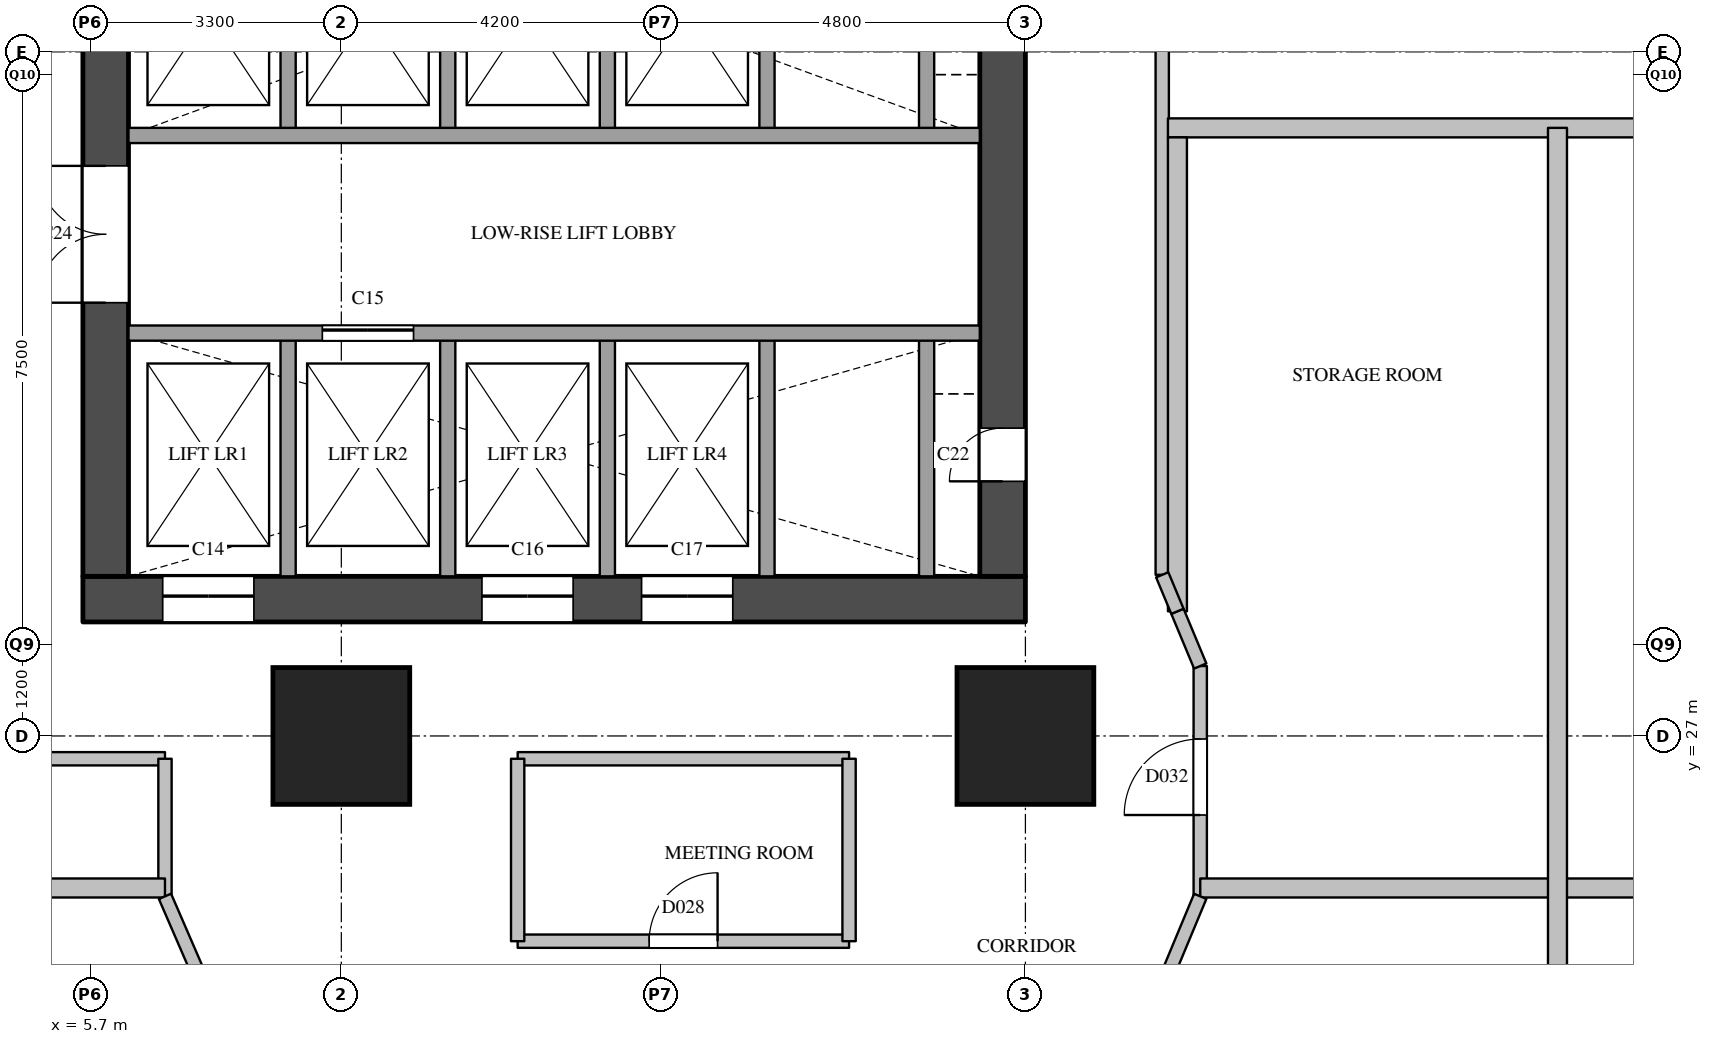
"""IFC4 building model, lengths in metres.
Left out: names, types, materials, properties, quantities, classifications, styles, units other than length and angle.
Written with IfcOpenShell. Run it as: python <this file> out.ifc"""

import sys

from ifc_helpers import new_model, si_unit, direction, frame, frame_2d, origin, origin_2d, place, context, subcontext, project, spatial, rectangle, extrude, element, fill, save


model = new_model("IFC4")
c1 = context("Model", 3, precision=1e-05, world=origin(), true_north=direction((0.0, 1.0)))
c2 = subcontext(c1, "Body", "Model", "MODEL_VIEW")
j1 = project(units=[si_unit("LENGTHUNIT", "METRE"), si_unit("PLANEANGLEUNIT", "RADIAN")], contexts=[c1])
p1 = place(None, origin())
s1 = spatial("IfcSite", under=j1, at=p1, CompositionType="ELEMENT")
p2 = place(p1, origin())
s2 = spatial("IfcBuilding", under=s1, at=p2, CompositionType="ELEMENT")
p3 = place(p2, frame((0.0, 0.0, 72.8)))
s3 = spatial("IfcBuildingStorey", under=s2, at=p3, CompositionType="ELEMENT", Elevation=72.8)
for number, where, z_axis, x_axis in (
    (1, (9.0, 27.0, 0.0), (0.0, 0.0, 1.0), (1.0, 0.0, 0.0)),
    (2, (18.0, 27.0, 0.0), (0.0, 0.0, 1.0), (1.0, 0.0, 0.0)),
):
    element("IfcColumn", number, at=place(p3, frame(where, z_axis=z_axis, x_axis=x_axis)), inside=s3, PredefinedType="COLUMN", context=c2, shape_type="SweptSolid", body=[
        extrude(rectangle(XDim=1.8, YDim=1.8, at=origin_2d()), origin(), (0.0, 0.0, 1.0), 5.0),
    ])
p4 = place(p3, frame((5.6, 28.8, 0.0), z_axis=(0.0, 0.0, 1.0), x_axis=(1.0, 0.0, 0.0)))
e3 = element("IfcWall", 3, at=p4, inside=s3, PredefinedType="SHEAR", context=c2, shape_type="SweptSolid", body=[
    extrude(rectangle(XDim=12.4, YDim=0.6, at=frame_2d((6.2, 0.0))), origin(), (0.0, 0.0, 1.0), 4.7),
])
p5 = place(p4, frame((1.05, 0.0, 0.0)))
e4 = element("IfcOpeningElement", 4, at=p5, cuts=e3, PredefinedType="OPENING", context=c2, shape_type="SweptSolid", body=[
    extrude(rectangle(XDim=1.2, YDim=2.1, at=frame_2d((0.6, 1.05))), frame((0.0, 0.31, 0.0), z_axis=(0.0, -1.0, 0.0), x_axis=(1.0, 0.0, 0.0)), (0.0, 0.0, 1.0), 0.62),
])
p6 = place(p4, frame((5.25, 0.0, 0.0)))
e5 = element("IfcOpeningElement", 5, at=p6, cuts=e3, PredefinedType="OPENING", context=c2, shape_type="SweptSolid", body=[
    extrude(rectangle(XDim=1.2, YDim=2.1, at=frame_2d((0.6, 1.05))), frame((0.0, 0.31, 0.0), z_axis=(0.0, -1.0, 0.0), x_axis=(1.0, 0.0, 0.0)), (0.0, 0.0, 1.0), 0.62),
])
p7 = place(p4, frame((7.35, 0.0, 0.0)))
e6 = element("IfcOpeningElement", 6, at=p7, cuts=e3, PredefinedType="OPENING", context=c2, shape_type="SweptSolid", body=[
    extrude(rectangle(XDim=1.2, YDim=2.1, at=frame_2d((0.6, 1.05))), frame((0.0, 0.31, 0.0), z_axis=(0.0, -1.0, 0.0), x_axis=(1.0, 0.0, 0.0)), (0.0, 0.0, 1.0), 0.62),
])
p8 = place(p3, frame((5.9, 29.1, 0.0), z_axis=(0.0, 0.0, 1.0), x_axis=(0.0, 1.0, 0.0)))
e7 = element("IfcWall", 7, at=p8, inside=s3, PredefinedType="SHEAR", context=c2, shape_type="SweptSolid", body=[
    extrude(rectangle(XDim=20.3, YDim=0.6, at=frame_2d((10.15, 0.0))), origin(), (0.0, 0.0, 1.0), 4.7),
])
p9 = place(p8, frame((3.6, 0.0, 0.0)))
e8 = element("IfcOpeningElement", 8, at=p9, cuts=e7, PredefinedType="OPENING", context=c2, shape_type="SweptSolid", body=[
    extrude(rectangle(XDim=1.8, YDim=2.1, at=frame_2d((0.9, 1.05))), frame((0.0, 0.31, 0.0), z_axis=(0.0, -1.0, 0.0), x_axis=(1.0, 0.0, 0.0)), (0.0, 0.0, 1.0), 0.62),
])
p10 = place(p8, frame((16.4, 0.0, 0.0)))
e9 = element("IfcOpeningElement", 9, at=p10, cuts=e7, PredefinedType="OPENING", context=c2, shape_type="SweptSolid", body=[
    extrude(rectangle(XDim=1.0, YDim=2.1, at=frame_2d((0.5, 1.05))), frame((0.0, 0.31, 0.0), z_axis=(0.0, -1.0, 0.0), x_axis=(1.0, 0.0, 0.0)), (0.0, 0.0, 1.0), 0.62),
])
p11 = place(p3, frame((17.7, 29.1, 0.0), z_axis=(0.0, 0.0, 1.0), x_axis=(0.0, 1.0, 0.0)))
e10 = element("IfcWall", 10, at=p11, inside=s3, PredefinedType="SHEAR", context=c2, shape_type="SweptSolid", body=[
    extrude(rectangle(XDim=20.3, YDim=0.6, at=frame_2d((10.15, 0.0))), origin(), (0.0, 0.0, 1.0), 4.7),
])
p12 = place(p11, frame((1.25, 0.0, 0.0)))
e11 = element("IfcOpeningElement", 11, at=p12, cuts=e10, PredefinedType="OPENING", context=c2, shape_type="SweptSolid", body=[
    extrude(rectangle(XDim=0.7, YDim=2.1, at=frame_2d((0.35, 1.05))), frame((0.0, 0.31, 0.0), z_axis=(0.0, -1.0, 0.0), x_axis=(1.0, 0.0, 0.0)), (0.0, 0.0, 1.0), 0.62),
])
p13 = place(p11, frame((7.05, 0.0, 0.0)))
e12 = element("IfcOpeningElement", 12, at=p13, cuts=e10, PredefinedType="OPENING", context=c2, shape_type="SweptSolid", body=[
    extrude(rectangle(XDim=0.7, YDim=2.1, at=frame_2d((0.35, 1.05))), frame((0.0, 0.31, 0.0), z_axis=(0.0, -1.0, 0.0), x_axis=(1.0, 0.0, 0.0)), (0.0, 0.0, 1.0), 0.62),
])
p14 = place(p3, frame((8.3, 29.1, 0.0), z_axis=(0.0, 0.0, 1.0), x_axis=(0.0, 1.0, 0.0)))
e13 = element("IfcWall", 13, at=p14, inside=s3, PredefinedType="SOLIDWALL", context=c2, shape_type="SweptSolid", body=[
    extrude(rectangle(XDim=3.2, YDim=0.2, at=frame_2d((1.6, 0.0))), origin(), (0.0, 0.0, 1.0), 4.7),
])
p15 = place(p3, frame((8.3, 34.9, 0.0), z_axis=(0.0, 0.0, 1.0), x_axis=(0.0, 1.0, 0.0)))
e14 = element("IfcWall", 14, at=p15, inside=s3, PredefinedType="SOLIDWALL", context=c2, shape_type="SweptSolid", body=[
    extrude(rectangle(XDim=3.2, YDim=0.2, at=frame_2d((1.6, 0.0))), origin(), (0.0, 0.0, 1.0), 4.7),
])
p16 = place(p3, frame((10.4, 29.1, 0.0), z_axis=(0.0, 0.0, 1.0), x_axis=(0.0, 1.0, 0.0)))
e15 = element("IfcWall", 15, at=p16, inside=s3, PredefinedType="SOLIDWALL", context=c2, shape_type="SweptSolid", body=[
    extrude(rectangle(XDim=3.2, YDim=0.2, at=frame_2d((1.6, 0.0))), origin(), (0.0, 0.0, 1.0), 4.7),
])
p17 = place(p3, frame((10.4, 34.9, 0.0), z_axis=(0.0, 0.0, 1.0), x_axis=(0.0, 1.0, 0.0)))
e16 = element("IfcWall", 16, at=p17, inside=s3, PredefinedType="SOLIDWALL", context=c2, shape_type="SweptSolid", body=[
    extrude(rectangle(XDim=3.2, YDim=0.2, at=frame_2d((1.6, 0.0))), origin(), (0.0, 0.0, 1.0), 4.7),
])
p18 = place(p3, frame((12.5, 29.1, 0.0), z_axis=(0.0, 0.0, 1.0), x_axis=(0.0, 1.0, 0.0)))
e17 = element("IfcWall", 17, at=p18, inside=s3, PredefinedType="SOLIDWALL", context=c2, shape_type="SweptSolid", body=[
    extrude(rectangle(XDim=3.2, YDim=0.2, at=frame_2d((1.6, 0.0))), origin(), (0.0, 0.0, 1.0), 4.7),
])
p19 = place(p3, frame((12.5, 34.9, 0.0), z_axis=(0.0, 0.0, 1.0), x_axis=(0.0, 1.0, 0.0)))
e18 = element("IfcWall", 18, at=p19, inside=s3, PredefinedType="SOLIDWALL", context=c2, shape_type="SweptSolid", body=[
    extrude(rectangle(XDim=3.2, YDim=0.2, at=frame_2d((1.6, 0.0))), origin(), (0.0, 0.0, 1.0), 4.7),
])
p20 = place(p3, frame((14.6, 29.1, 0.0), z_axis=(0.0, 0.0, 1.0), x_axis=(0.0, 1.0, 0.0)))
e19 = element("IfcWall", 19, at=p20, inside=s3, PredefinedType="SOLIDWALL", context=c2, shape_type="SweptSolid", body=[
    extrude(rectangle(XDim=3.2, YDim=0.2, at=frame_2d((1.6, 0.0))), origin(), (0.0, 0.0, 1.0), 4.7),
])
p21 = place(p3, frame((14.6, 34.9, 0.0), z_axis=(0.0, 0.0, 1.0), x_axis=(0.0, 1.0, 0.0)))
e20 = element("IfcWall", 20, at=p21, inside=s3, PredefinedType="SOLIDWALL", context=c2, shape_type="SweptSolid", body=[
    extrude(rectangle(XDim=3.2, YDim=0.2, at=frame_2d((1.6, 0.0))), origin(), (0.0, 0.0, 1.0), 4.7),
])
p22 = place(p3, frame((16.7, 29.1, 0.0), z_axis=(0.0, 0.0, 1.0), x_axis=(0.0, 1.0, 0.0)))
e21 = element("IfcWall", 21, at=p22, inside=s3, PredefinedType="SOLIDWALL", context=c2, shape_type="SweptSolid", body=[
    extrude(rectangle(XDim=3.2, YDim=0.2, at=frame_2d((1.6, 0.0))), origin(), (0.0, 0.0, 1.0), 4.7),
])
p23 = place(p3, frame((16.7, 34.9, 0.0), z_axis=(0.0, 0.0, 1.0), x_axis=(0.0, 1.0, 0.0)))
e22 = element("IfcWall", 22, at=p23, inside=s3, PredefinedType="SOLIDWALL", context=c2, shape_type="SweptSolid", body=[
    extrude(rectangle(XDim=3.2, YDim=0.2, at=frame_2d((1.6, 0.0))), origin(), (0.0, 0.0, 1.0), 4.7),
])
p24 = place(p3, frame((6.2, 32.3, 0.0), z_axis=(0.0, 0.0, 1.0), x_axis=(1.0, 0.0, 0.0)))
e23 = element("IfcWall", 23, at=p24, inside=s3, PredefinedType="SOLIDWALL", context=c2, shape_type="SweptSolid", body=[
    extrude(rectangle(XDim=11.2, YDim=0.2, at=frame_2d((5.6, 0.0))), origin(), (0.0, 0.0, 1.0), 4.7),
])
p25 = place(p24, frame((2.55, 0.0, 0.0)))
e24 = element("IfcOpeningElement", 24, at=p25, cuts=e23, PredefinedType="OPENING", context=c2, shape_type="SweptSolid", body=[
    extrude(rectangle(XDim=1.2, YDim=2.1, at=frame_2d((0.6, 1.05))), frame((0.0, 0.11, 0.0), z_axis=(0.0, -1.0, 0.0), x_axis=(1.0, 0.0, 0.0)), (0.0, 0.0, 1.0), 0.22),
])
p26 = place(p3, frame((6.2, 34.9, 0.0), z_axis=(0.0, 0.0, 1.0), x_axis=(1.0, 0.0, 0.0)))
e25 = element("IfcWall", 25, at=p26, inside=s3, PredefinedType="SOLIDWALL", context=c2, shape_type="SweptSolid", body=[
    extrude(rectangle(XDim=11.2, YDim=0.2, at=frame_2d((5.6, 0.0))), origin(), (0.0, 0.0, 1.0), 4.7),
])
p27 = place(p3, frame((11.32, 24.3, 0.0), z_axis=(0.0, 0.0, 1.0), x_axis=(1.0, 0.0, 0.0)))
e26 = element("IfcWall", 26, at=p27, inside=s3, PredefinedType="PARTITIONING", context=c2, shape_type="SweptSolid", body=[
    extrude(rectangle(XDim=4.36, YDim=0.175, at=frame_2d((2.18, 0.0))), origin(), (0.0, 0.0, 1.0), 4.7),
])
p28 = place(p27, frame((1.73, 0.0, 0.0)))
e27 = element("IfcOpeningElement", 27, at=p28, cuts=e26, PredefinedType="OPENING", context=c2, shape_type="SweptSolid", body=[
    extrude(rectangle(XDim=0.9, YDim=2.1, at=frame_2d((0.45, 1.05))), frame((0.0, 0.097, 0.0), z_axis=(0.0, -1.0, 0.0), x_axis=(1.0, 0.0, 0.0)), (0.0, 0.0, 1.0), 0.195),
])
p29 = place(p3, frame((3.8, 26.7, 0.0), z_axis=(0.0, 0.0, 1.0), x_axis=(1.0, 0.0, 0.0)))
e28 = element("IfcWall", 28, at=p29, inside=s3, PredefinedType="PARTITIONING", context=c2, shape_type="SweptSolid", body=[
    extrude(rectangle(XDim=2.88, YDim=0.175, at=frame_2d((1.44, 0.0))), origin(), (0.0, 0.0, 1.0), 3.59),
])
p30 = place(p3, frame((11.32, 26.7, 0.0), z_axis=(0.0, 0.0, 1.0), x_axis=(1.0, 0.0, 0.0)))
e29 = element("IfcWall", 29, at=p30, inside=s3, PredefinedType="PARTITIONING", context=c2, shape_type="SweptSolid", body=[
    extrude(rectangle(XDim=4.36, YDim=0.175, at=frame_2d((2.18, 0.0))), origin(), (0.0, 0.0, 1.0), 3.59),
])
p31 = place(p3, frame((6.68, 24.89, 0.0), z_axis=(0.0, 0.0, 1.0), x_axis=(0.0, 1.0, 0.0)))
e30 = element("IfcWall", 30, at=p31, inside=s3, PredefinedType="PARTITIONING", context=c2, shape_type="SweptSolid", body=[
    extrude(rectangle(XDim=1.81, YDim=0.175, at=frame_2d((0.905, 0.0))), origin(), (0.0, 0.0, 1.0), 3.59),
])
for number, where, z_axis, x_axis in (
    (31, (11.32, 24.3, 0.0), (0.0, 0.0, 1.0), (0.0, 1.0, 0.0)),
    (32, (15.68, 24.3, 0.0), (0.0, 0.0, 1.0), (0.0, 1.0, 0.0)),
):
    element("IfcWall", number, at=place(p3, frame(where, z_axis=z_axis, x_axis=x_axis)), inside=s3, PredefinedType="PARTITIONING", context=c2, shape_type="SweptSolid", body=[
        extrude(rectangle(XDim=2.4, YDim=0.175, at=frame_2d((1.2, 0.0))), origin(), (0.0, 0.0, 1.0), 3.59),
    ])
p32 = place(p3, frame((19.8, 29.12, 0.0), z_axis=(0.0, 0.0, 1.0), x_axis=(0.0, 1.0, 0.0)))
e33 = element("IfcWall", 33, at=p32, inside=s3, PredefinedType="PARTITIONING", context=c2, shape_type="SweptSolid", body=[
    extrude(rectangle(XDim=22.68, YDim=0.175, at=frame_2d((11.34, 0.0))), origin(), (0.0, 0.0, 1.0), 4.7),
])
p33 = place(p32, frame((7.49, 0.0, 0.0)))
e34 = element("IfcOpeningElement", 34, at=p33, cuts=e33, PredefinedType="OPENING", context=c2, shape_type="SweptSolid", body=[
    extrude(rectangle(XDim=0.9, YDim=2.1, at=frame_2d((0.45, 1.05))), frame((0.0, 0.097, 0.0), z_axis=(0.0, -1.0, 0.0), x_axis=(1.0, 0.0, 0.0)), (0.0, 0.0, 1.0), 0.195),
])
p34 = place(p3, frame((20.3, 24.89, 0.0), z_axis=(0.0, 0.0, 1.0), x_axis=(0.0, 1.0, 0.0)))
e35 = element("IfcWall", 35, at=p34, inside=s3, PredefinedType="PARTITIONING", context=c2, shape_type="SweptSolid", body=[
    extrude(rectangle(XDim=3.03, YDim=0.175, at=frame_2d((1.515, 0.0))), origin(), (0.0, 0.0, 1.0), 3.59),
])
p35 = place(p34, frame((1.07, 0.0, 0.0)))
e36 = element("IfcOpeningElement", 36, at=p35, cuts=e35, PredefinedType="OPENING", context=c2, shape_type="SweptSolid", body=[
    extrude(rectangle(XDim=1.0, YDim=2.1, at=frame_2d((0.5, 1.05))), frame((0.0, 0.097, 0.0), z_axis=(0.0, -1.0, 0.0), x_axis=(1.0, 0.0, 0.0)), (0.0, 0.0, 1.0), 0.195),
])
p36 = place(p3, frame((0.0, 25.0, 0.0), z_axis=(0.0, 0.0, 1.0), x_axis=(1.0, 0.0, 0.0)))
e37 = element("IfcWall", 37, at=p36, inside=s3, PredefinedType="PARTITIONING", context=c2, shape_type="SweptSolid", body=[
    extrude(rectangle(XDim=6.68, YDim=0.25, at=frame_2d((3.34, 0.0))), origin(), (0.0, 0.0, 1.0), 3.59),
])
p37 = place(p3, frame((20.3, 25.0, 0.0), z_axis=(0.0, 0.0, 1.0), x_axis=(1.0, 0.0, 0.0)))
e38 = element("IfcWall", 38, at=p37, inside=s3, PredefinedType="PARTITIONING", context=c2, shape_type="SweptSolid", body=[
    extrude(rectangle(XDim=13.4, YDim=0.25, at=frame_2d((6.7, 0.0))), origin(), (0.0, 0.0, 1.0), 3.59),
])
p38 = place(p3, frame((19.875, 35.0, 0.0), z_axis=(0.0, 0.0, 1.0), x_axis=(1.0, 0.0, 0.0)))
e39 = element("IfcWall", 39, at=p38, inside=s3, PredefinedType="PARTITIONING", context=c2, shape_type="SweptSolid", body=[
    extrude(rectangle(XDim=14.325, YDim=0.25, at=frame_2d((7.163, 0.0))), origin(), (0.0, 0.0, 1.0), 3.7),
])
p39 = place(p3, frame((20.0, 28.64, 0.0), z_axis=(0.0, 0.0, 1.0), x_axis=(0.0, 1.0, 0.0)))
e40 = element("IfcWall", 40, at=p39, inside=s3, PredefinedType="PARTITIONING", context=c2, shape_type="SweptSolid", body=[
    extrude(rectangle(XDim=6.235, YDim=0.25, at=frame_2d((3.118, 0.0))), origin(), (0.0, 0.0, 1.0), 4.7),
])
p40 = place(p3, frame((25.0, 0.0, 0.0), z_axis=(0.0, 0.0, 1.0), x_axis=(0.0, 1.0, 0.0)))
e41 = element("IfcWall", 41, at=p40, inside=s3, PredefinedType="PARTITIONING", context=c2, shape_type="SweptSolid", body=[
    extrude(rectangle(XDim=35.0, YDim=0.25, at=frame_2d((17.5, 0.0))), origin(), (0.0, 0.0, 1.0), 3.59),
])
p41 = place(p3, frame((20.3, 24.89, 0.0), z_axis=(0.0, 0.0, 1.0), x_axis=(-0.384628719983, -0.923071366561, 0.0)))
e42 = element("IfcWall", 42, at=p41, inside=s3, PredefinedType="PARTITIONING", context=c2, shape_type="SweptSolid", body=[
    extrude(rectangle(XDim=1.3, YDim=0.175, at=frame_2d((0.65, 0.0))), origin(), (0.0, 0.0, 1.0), 4.7),
])
p42 = place(p3, frame((7.2, 23.69, 0.0), z_axis=(0.0, 0.0, 1.0), x_axis=(-0.397633632391, 0.917544273804, 0.0)))
e43 = element("IfcWall", 43, at=p42, inside=s3, PredefinedType="PARTITIONING", context=c2, shape_type="SweptSolid", body=[
    extrude(rectangle(XDim=1.308, YDim=0.175, at=frame_2d((0.654, 0.0))), origin(), (0.0, 0.0, 1.0), 4.7),
])
p43 = place(p3, frame((20.0, 28.64, 0.0), z_axis=(0.0, 0.0, 1.0), x_axis=(0.384682059045, -0.923049139238, 0.0)))
e44 = element("IfcWall", 44, at=p43, inside=s3, PredefinedType="PARTITIONING", context=c2, shape_type="SweptSolid", body=[
    extrude(rectangle(XDim=0.78, YDim=0.175, at=frame_2d((0.39, 0.0))), origin(), (0.0, 0.0, 1.0), 4.7),
])
p44 = place(p3, frame((19.8, 29.12, 0.0), z_axis=(0.0, 0.0, 1.0), x_axis=(0.384382095383, -0.92317409233, 0.0)))
e45 = element("IfcWall", 45, at=p44, inside=s3, PredefinedType="PARTITIONING", context=c2, shape_type="SweptSolid", body=[
    extrude(rectangle(XDim=0.52, YDim=0.175, at=frame_2d((0.26, 0.0))), origin(), (0.0, 0.0, 1.0), 4.7),
])
p45 = place(p5, origin())
e46 = element("IfcDoor", 46, at=p45, inside=s3, OperationType="SLIDING_TO_LEFT", PredefinedType="DOOR", context=c2, shape_type="SweptSolid", body=[
    extrude(rectangle(XDim=1.2, YDim=2.1, at=frame_2d((0.6, 1.05))), frame((0.0, 0.025, 0.0), z_axis=(0.0, -1.0, 0.0), x_axis=(1.0, 0.0, 0.0)), (0.0, 0.0, 1.0), 0.05),
])
fill(e4, e46)
p46 = place(p25, origin())
e47 = element("IfcDoor", 47, at=p46, inside=s3, OperationType="SLIDING_TO_LEFT", PredefinedType="DOOR", context=c2, shape_type="SweptSolid", body=[
    extrude(rectangle(XDim=1.2, YDim=2.1, at=frame_2d((0.6, 1.05))), frame((0.0, 0.025, 0.0), z_axis=(0.0, -1.0, 0.0), x_axis=(1.0, 0.0, 0.0)), (0.0, 0.0, 1.0), 0.05),
])
fill(e24, e47)
p47 = place(p6, origin())
e48 = element("IfcDoor", 48, at=p47, inside=s3, OperationType="SLIDING_TO_LEFT", PredefinedType="DOOR", context=c2, shape_type="SweptSolid", body=[
    extrude(rectangle(XDim=1.2, YDim=2.1, at=frame_2d((0.6, 1.05))), frame((0.0, 0.025, 0.0), z_axis=(0.0, -1.0, 0.0), x_axis=(1.0, 0.0, 0.0)), (0.0, 0.0, 1.0), 0.05),
])
fill(e5, e48)
p48 = place(p7, origin())
e49 = element("IfcDoor", 49, at=p48, inside=s3, OperationType="SLIDING_TO_LEFT", PredefinedType="DOOR", context=c2, shape_type="SweptSolid", body=[
    extrude(rectangle(XDim=1.2, YDim=2.1, at=frame_2d((0.6, 1.05))), frame((0.0, 0.025, 0.0), z_axis=(0.0, -1.0, 0.0), x_axis=(1.0, 0.0, 0.0)), (0.0, 0.0, 1.0), 0.05),
])
fill(e6, e49)
p49 = place(p12, origin())
e50 = element("IfcDoor", 50, at=p49, inside=s3, OperationType="SINGLE_SWING_LEFT", PredefinedType="DOOR", context=c2, shape_type="SweptSolid", body=[
    extrude(rectangle(XDim=0.7, YDim=2.1, at=frame_2d((0.35, 1.05))), frame((0.0, 0.025, 0.0), z_axis=(0.0, -1.0, 0.0), x_axis=(1.0, 0.0, 0.0)), (0.0, 0.0, 1.0), 0.05),
])
fill(e11, e50)
p50 = place(p9, origin())
e51 = element("IfcDoor", 51, at=p50, inside=s3, OperationType="DOUBLE_DOOR_SINGLE_SWING", PredefinedType="DOOR", context=c2, shape_type="SweptSolid", body=[
    extrude(rectangle(XDim=1.8, YDim=2.1, at=frame_2d((0.9, 1.05))), frame((0.0, 0.025, 0.0), z_axis=(0.0, -1.0, 0.0), x_axis=(1.0, 0.0, 0.0)), (0.0, 0.0, 1.0), 0.05),
])
fill(e8, e51)
p51 = place(p28, origin())
e52 = element("IfcDoor", 52, at=p51, inside=s3, OperationType="SINGLE_SWING_RIGHT", PredefinedType="DOOR", context=c2, shape_type="SweptSolid", body=[
    extrude(rectangle(XDim=0.9, YDim=2.1, at=frame_2d((0.45, 1.05))), frame((0.0, 0.025, 0.0), z_axis=(0.0, -1.0, 0.0), x_axis=(1.0, 0.0, 0.0)), (0.0, 0.0, 1.0), 0.05),
])
fill(e27, e52)
p52 = place(p35, origin())
e53 = element("IfcDoor", 53, at=p52, inside=s3, OperationType="SINGLE_SWING_LEFT", PredefinedType="DOOR", context=c2, shape_type="SweptSolid", body=[
    extrude(rectangle(XDim=1.0, YDim=2.1, at=frame_2d((0.5, 1.05))), frame((0.0, 0.025, 0.0), z_axis=(0.0, -1.0, 0.0), x_axis=(1.0, 0.0, 0.0)), (0.0, 0.0, 1.0), 0.05),
])
fill(e36, e53)
save(model, sys.argv[1])
